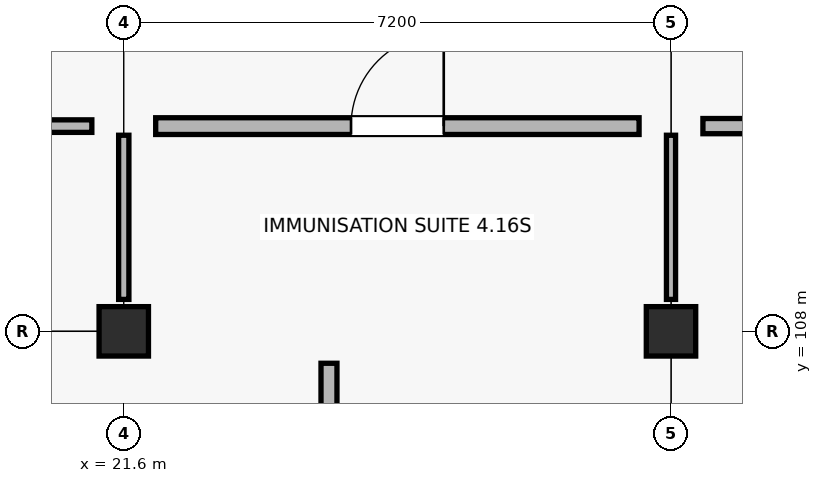
"""IFC4 building model, lengths in metres.
Left out: names, types, materials, properties, quantities, classifications, styles, units other than length and angle.
Written with IfcOpenShell. Run it as: python <this file> out.ifc"""

import sys

from ifc_helpers import new_model, si_unit, direction, frame, frame_2d, origin, origin_2d, place, context, subcontext, project, spatial, rectangle, extrude, element, fill, save


model = new_model("IFC4")
c1 = context("Model", 3, precision=1e-05, world=origin(), true_north=direction((0.0, 1.0)))
c2 = subcontext(c1, "Body", "Model", "MODEL_VIEW")
j1 = project(units=[si_unit("LENGTHUNIT", "METRE"), si_unit("PLANEANGLEUNIT", "RADIAN")], contexts=[c1])
p1 = place(None, origin())
s1 = spatial("IfcSite", under=j1, at=p1, CompositionType="ELEMENT")
p2 = place(p1, origin())
s2 = spatial("IfcBuilding", under=s1, at=p2, CompositionType="ELEMENT")
p3 = place(p2, frame((0.0, 0.0, 9.0)))
s3 = spatial("IfcBuildingStorey", under=s2, at=p3, CompositionType="ELEMENT", Elevation=9.0)
for number, where, z_axis, x_axis in (
    (1, (21.6, 108.0, 0.0), (0.0, 0.0, 1.0), (1.0, 0.0, 0.0)),
    (2, (28.8, 108.0, 0.0), (0.0, 0.0, 1.0), (1.0, 0.0, 0.0)),
):
    element("IfcColumn", number, at=place(p3, frame(where, z_axis=z_axis, x_axis=x_axis)), inside=s3, PredefinedType="COLUMN", context=c2, shape_type="SweptSolid", body=[
        extrude(rectangle(XDim=0.65, YDim=0.65, at=origin_2d()), origin(), (0.0, 0.0, 1.0), 4.5),
    ])
p4 = place(p3, frame((29.22, 110.7, 0.0), z_axis=(0.0, 0.0, 1.0), x_axis=(1.0, 0.0, 0.0)))
e3 = element("IfcWall", 3, at=p4, inside=s3, PredefinedType="SOLIDWALL", context=c2, shape_type="SweptSolid", body=[
    extrude(rectangle(XDim=6.36, YDim=0.2, at=frame_2d((3.18, 0.0))), origin(), (0.0, 0.0, 1.0), 3.38),
])
p5 = place(p4, frame((2.43, 0.0, 0.0)))
e4 = element("IfcOpeningElement", 4, at=p5, cuts=e3, PredefinedType="OPENING", context=c2, shape_type="SweptSolid", body=[
    extrude(rectangle(XDim=1.5, YDim=2.2, at=frame_2d((0.75, 1.1))), frame((0.0, 0.11, 0.0), z_axis=(0.0, -1.0, 0.0), x_axis=(1.0, 0.0, 0.0)), (0.0, 0.0, 1.0), 0.22),
])
p6 = place(p3, frame((14.82, 110.7, 0.0), z_axis=(0.0, 0.0, 1.0), x_axis=(1.0, 0.0, 0.0)))
e5 = element("IfcWall", 5, at=p6, inside=s3, PredefinedType="PARTITIONING", context=c2, shape_type="SweptSolid", body=[
    extrude(rectangle(XDim=6.36, YDim=0.165, at=frame_2d((3.18, 0.0))), origin(), (0.0, 0.0, 1.0), 3.38),
])
p7 = place(p6, frame((2.59, 0.0, 0.0)))
e6 = element("IfcOpeningElement", 6, at=p7, cuts=e5, PredefinedType="OPENING", context=c2, shape_type="SweptSolid", body=[
    extrude(rectangle(XDim=1.18, YDim=2.09, at=frame_2d((0.59, 1.045))), frame((0.0, 0.093, 0.0), z_axis=(0.0, -1.0, 0.0), x_axis=(1.0, 0.0, 0.0)), (0.0, 0.0, 1.0), 0.185),
])
p8 = place(p3, frame((21.6, 108.42, 0.0), z_axis=(0.0, 0.0, 1.0), x_axis=(0.0, 1.0, 0.0)))
e7 = element("IfcWall", 7, at=p8, inside=s3, PredefinedType="PARTITIONING", context=c2, shape_type="SweptSolid", body=[
    extrude(rectangle(XDim=2.16, YDim=0.135, at=frame_2d((1.08, 0.0))), origin(), (0.0, 0.0, 1.0), 3.38),
])
p9 = place(p3, frame((24.3, 105.5, 0.0), z_axis=(0.0, 0.0, 1.0), x_axis=(0.0, 1.0, 0.0)))
e8 = element("IfcWall", 8, at=p9, inside=s3, PredefinedType="PLUMBINGWALL", context=c2, shape_type="SweptSolid", body=[
    extrude(rectangle(XDim=2.08, YDim=0.21, at=frame_2d((1.04, 0.0))), origin(), (0.0, 0.0, 1.0), 3.38),
])
p10 = place(p3, frame((22.02, 110.7, 0.0), z_axis=(0.0, 0.0, 1.0), x_axis=(1.0, 0.0, 0.0)))
e9 = element("IfcWall", 9, at=p10, inside=s3, PredefinedType="SOLIDWALL", context=c2, shape_type="SweptSolid", body=[
    extrude(rectangle(XDim=6.36, YDim=0.22, at=frame_2d((3.18, 0.0))), origin(), (0.0, 0.0, 1.0), 3.38),
])
p11 = place(p10, frame((2.57, 0.0, 0.0)))
e10 = element("IfcOpeningElement", 10, at=p11, cuts=e9, PredefinedType="OPENING", context=c2, shape_type="SweptSolid", body=[
    extrude(rectangle(XDim=1.22, YDim=2.14, at=frame_2d((0.61, 1.07))), frame((0.0, 0.12, 0.0), z_axis=(0.0, -1.0, 0.0), x_axis=(1.0, 0.0, 0.0)), (0.0, 0.0, 1.0), 0.24),
])
p12 = place(p3, frame((28.8, 108.42, 0.0), z_axis=(0.0, 0.0, 1.0), x_axis=(0.0, 1.0, 0.0)))
e11 = element("IfcWall", 11, at=p12, inside=s3, PredefinedType="PARTITIONING", context=c2, shape_type="SweptSolid", body=[
    extrude(rectangle(XDim=2.16, YDim=0.12, at=frame_2d((1.08, 0.0))), origin(), (0.0, 0.0, 1.0), 3.38),
])
p13 = place(p11, origin())
e12 = element("IfcDoor", 12, at=p13, inside=s3, OperationType="SINGLE_SWING_RIGHT", PredefinedType="DOOR", context=c2, shape_type="SweptSolid", body=[
    extrude(rectangle(XDim=1.22, YDim=2.14, at=frame_2d((0.61, 1.07))), frame((0.0, 0.025, 0.0), z_axis=(0.0, -1.0, 0.0), x_axis=(1.0, 0.0, 0.0)), (0.0, 0.0, 1.0), 0.05),
])
fill(e10, e12)
save(model, sys.argv[1])
